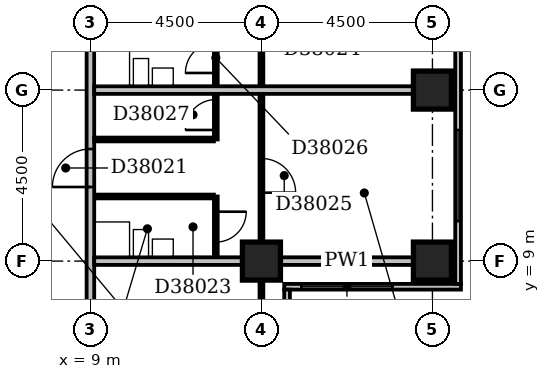
"""IFC4 building model, lengths in metres.
Left out: names, types, materials, properties, quantities, classifications, styles, units other than length and angle.
Written with IfcOpenShell. Run it as: python <this file> out.ifc"""

import sys

from ifc_helpers import new_model, si_unit, direction, frame, frame_2d, origin, origin_2d, place, context, subcontext, project, spatial, rectangle, extrude, element, fill, save


model = new_model("IFC4")
c1 = context("Model", 3, precision=1e-05, world=origin(), true_north=direction((0.0, 1.0)))
c2 = subcontext(c1, "Body", "Model", "MODEL_VIEW")
j1 = project(units=[si_unit("LENGTHUNIT", "METRE"), si_unit("PLANEANGLEUNIT", "RADIAN")], contexts=[c1])
p1 = place(None, origin())
s1 = spatial("IfcSite", under=j1, at=p1, CompositionType="ELEMENT")
p2 = place(p1, origin())
s2 = spatial("IfcBuilding", under=s1, at=p2, CompositionType="ELEMENT")
p3 = place(p2, frame((0.0, 0.0, 152.0)))
s3 = spatial("IfcBuildingStorey", under=s2, at=p3, CompositionType="ELEMENT", Elevation=152.0)
for number, where, z_axis, x_axis in (
    (1, (13.5, 9.0, -0.3), (0.0, 0.0, 1.0), (1.0, 0.0, 0.0)),
    (2, (18.0, 9.0, -0.3), (0.0, 0.0, 1.0), (1.0, 0.0, 0.0)),
    (3, (18.0, 13.5, -0.3), (0.0, 0.0, 1.0), (1.0, 0.0, 0.0)),
):
    element("IfcColumn", number, at=place(p3, frame(where, z_axis=z_axis, x_axis=x_axis)), inside=s3, PredefinedType="COLUMN", context=c2, shape_type="SweptSolid", body=[
        extrude(rectangle(XDim=1.0, YDim=1.0, at=origin_2d()), origin(), (0.0, 0.0, 1.0), 3.6),
    ])
p4 = place(p3, frame((14.175, 3.9, 0.0), z_axis=(0.0, 0.0, 1.0), x_axis=(0.0, 1.0, 0.0)))
e4 = element("IfcWall", 4, at=p4, inside=s3, PredefinedType="STANDARD", context=c2, shape_type="SweptSolid", body=[
    extrude(rectangle(XDim=4.35, YDim=0.15, at=frame_2d((2.175, 0.0))), origin(), (0.0, 0.0, 1.0), 2.7),
])
p5 = place(p4, frame((1.65, 0.0, 0.6)))
e5 = element("IfcOpeningElement", 5, at=p5, cuts=e4, PredefinedType="OPENING", context=c2, shape_type="SweptSolid", body=[
    extrude(rectangle(XDim=2.4, YDim=1.8, at=frame_2d((1.2, 0.9))), frame((0.0, 0.087, 0.0), z_axis=(0.0, -1.0, 0.0), x_axis=(1.0, 0.0, 0.0)), (0.0, 0.0, 1.0), 0.174),
])
p6 = place(p3, frame((14.1, 8.325, 0.0), z_axis=(0.0, 0.0, 1.0), x_axis=(1.0, 0.0, 0.0)))
e6 = element("IfcWall", 6, at=p6, inside=s3, PredefinedType="STANDARD", context=c2, shape_type="SweptSolid", body=[
    extrude(rectangle(XDim=4.65, YDim=0.15, at=frame_2d((2.325, 0.0))), origin(), (0.0, 0.0, 1.0), 2.7),
])
p7 = place(p6, frame((0.45, 0.0, 0.6)))
e7 = element("IfcOpeningElement", 7, at=p7, cuts=e6, PredefinedType="OPENING", context=c2, shape_type="SweptSolid", body=[
    extrude(rectangle(XDim=2.4, YDim=1.8, at=frame_2d((1.2, 0.9))), frame((0.0, 0.087, 0.0), z_axis=(0.0, -1.0, 0.0), x_axis=(1.0, 0.0, 0.0)), (0.0, 0.0, 1.0), 0.174),
])
p8 = place(p3, frame((18.675, 8.4, 0.0), z_axis=(0.0, 0.0, 1.0), x_axis=(0.0, 1.0, 0.0)))
e8 = element("IfcWall", 8, at=p8, inside=s3, PredefinedType="STANDARD", context=c2, shape_type="SweptSolid", body=[
    extrude(rectangle(XDim=8.85, YDim=0.15, at=frame_2d((4.425, 0.0))), origin(), (0.0, 0.0, 1.0), 2.7),
])
p9 = place(p8, frame((1.65, 0.0, 0.6)))
e9 = element("IfcOpeningElement", 9, at=p9, cuts=e8, PredefinedType="OPENING", context=c2, shape_type="SweptSolid", body=[
    extrude(rectangle(XDim=2.4, YDim=1.8, at=frame_2d((1.2, 0.9))), frame((0.0, 0.087, 0.0), z_axis=(0.0, -1.0, 0.0), x_axis=(1.0, 0.0, 0.0)), (0.0, 0.0, 1.0), 0.174),
])
p10 = place(p8, frame((6.15, 0.0, 0.6)))
e10 = element("IfcOpeningElement", 10, at=p10, cuts=e8, PredefinedType="OPENING", context=c2, shape_type="SweptSolid", body=[
    extrude(rectangle(XDim=2.4, YDim=1.8, at=frame_2d((1.2, 0.9))), frame((0.0, 0.087, 0.0), z_axis=(0.0, -1.0, 0.0), x_axis=(1.0, 0.0, 0.0)), (0.0, 0.0, 1.0), 0.174),
])
p11 = place(p3, frame((9.0, 5.0, 0.0), z_axis=(0.0, 0.0, 1.0), x_axis=(0.0, 1.0, 0.0)))
e11 = element("IfcWall", 11, at=p11, inside=s3, PredefinedType="PARTITIONING", context=c2, shape_type="SweptSolid", body=[
    extrude(rectangle(XDim=27.75, YDim=0.2, at=frame_2d((13.875, 0.0))), origin(), (0.0, 0.0, 1.0), 3.3),
])
p12 = place(p11, frame((22.8, 0.0, 0.0)))
e12 = element("IfcOpeningElement", 12, at=p12, cuts=e11, PredefinedType="OPENING", context=c2, shape_type="SweptSolid", body=[
    extrude(rectangle(XDim=1.0, YDim=2.1, at=frame_2d((0.5, 1.05))), frame((0.0, 0.112, 0.0), z_axis=(0.0, -1.0, 0.0), x_axis=(1.0, 0.0, 0.0)), (0.0, 0.0, 1.0), 0.224),
])
p13 = place(p11, frame((14.95, 0.0, 0.0)))
e13 = element("IfcOpeningElement", 13, at=p13, cuts=e11, PredefinedType="OPENING", context=c2, shape_type="SweptSolid", body=[
    extrude(rectangle(XDim=1.0, YDim=2.1, at=frame_2d((0.5, 1.05))), frame((0.0, 0.112, 0.0), z_axis=(0.0, -1.0, 0.0), x_axis=(1.0, 0.0, 0.0)), (0.0, 0.0, 1.0), 0.224),
])
p14 = place(p11, frame((10.45, 0.0, 0.0)))
e14 = element("IfcOpeningElement", 14, at=p14, cuts=e11, PredefinedType="OPENING", context=c2, shape_type="SweptSolid", body=[
    extrude(rectangle(XDim=1.0, YDim=2.1, at=frame_2d((0.5, 1.05))), frame((0.0, 0.112, 0.0), z_axis=(0.0, -1.0, 0.0), x_axis=(1.0, 0.0, 0.0)), (0.0, 0.0, 1.0), 0.224),
])
p15 = place(p11, frame((5.95, 0.0, 0.0)))
e15 = element("IfcOpeningElement", 15, at=p15, cuts=e11, PredefinedType="OPENING", context=c2, shape_type="SweptSolid", body=[
    extrude(rectangle(XDim=1.0, YDim=2.1, at=frame_2d((0.5, 1.05))), frame((0.0, 0.112, 0.0), z_axis=(0.0, -1.0, 0.0), x_axis=(1.0, 0.0, 0.0)), (0.0, 0.0, 1.0), 0.224),
])
p16 = place(p11, frame((1.5, 0.0, 0.0)))
e16 = element("IfcOpeningElement", 16, at=p16, cuts=e11, PredefinedType="OPENING", context=c2, shape_type="SweptSolid", body=[
    extrude(rectangle(XDim=0.9, YDim=2.1, at=frame_2d((0.45, 1.05))), frame((0.0, 0.112, 0.0), z_axis=(0.0, -1.0, 0.0), x_axis=(1.0, 0.0, 0.0)), (0.0, 0.0, 1.0), 0.224),
])
p17 = place(p3, frame((13.5, 5.0, 0.0), z_axis=(0.0, 0.0, 1.0), x_axis=(0.0, 1.0, 0.0)))
e17 = element("IfcWall", 17, at=p17, inside=s3, PredefinedType="PARTITIONING", context=c2, shape_type="SweptSolid", body=[
    extrude(rectangle(XDim=3.5, YDim=0.1, at=frame_2d((1.75, 0.0))), origin(), (0.0, 0.0, 1.0), 2.7),
])
p18 = place(p3, frame((9.1, 9.0, 0.0), z_axis=(0.0, 0.0, 1.0), x_axis=(1.0, 0.0, 0.0)))
e18 = element("IfcWall", 18, at=p18, inside=s3, PredefinedType="PARTITIONING", context=c2, shape_type="SweptSolid", body=[
    extrude(rectangle(XDim=3.9, YDim=0.2, at=frame_2d((1.95, 0.0))), origin(), (0.0, 0.0, 1.0), 3.3),
])
p19 = place(p3, frame((14.0, 9.0, 0.0), z_axis=(0.0, 0.0, 1.0), x_axis=(1.0, 0.0, 0.0)))
e19 = element("IfcWall", 19, at=p19, inside=s3, PredefinedType="PARTITIONING", context=c2, shape_type="SweptSolid", body=[
    extrude(rectangle(XDim=3.5, YDim=0.2, at=frame_2d((1.75, 0.0))), origin(), (0.0, 0.0, 1.0), 2.7),
])
p20 = place(p3, frame((12.3, 9.1, 0.0), z_axis=(0.0, 0.0, 1.0), x_axis=(0.0, 1.0, 0.0)))
e20 = element("IfcWall", 20, at=p20, inside=s3, PredefinedType="PARTITIONING", context=c2, shape_type="SweptSolid", body=[
    extrude(rectangle(XDim=1.6, YDim=0.1, at=frame_2d((0.8, 0.0))), origin(), (0.0, 0.0, 1.0), 3.3),
])
p21 = place(p20, frame((0.4, 0.0, 0.0)))
e21 = element("IfcOpeningElement", 21, at=p21, cuts=e20, PredefinedType="OPENING", context=c2, shape_type="SweptSolid", body=[
    extrude(rectangle(XDim=0.8, YDim=2.1, at=frame_2d((0.4, 1.05))), frame((0.0, 0.062, 0.0), z_axis=(0.0, -1.0, 0.0), x_axis=(1.0, 0.0, 0.0)), (0.0, 0.0, 1.0), 0.124),
])
p22 = place(p3, frame((13.5, 9.5, 0.0), z_axis=(0.0, 0.0, 1.0), x_axis=(0.0, 1.0, 0.0)))
e22 = element("IfcWall", 22, at=p22, inside=s3, PredefinedType="PARTITIONING", context=c2, shape_type="SweptSolid", body=[
    extrude(rectangle(XDim=8.4, YDim=0.1, at=frame_2d((4.2, 0.0))), origin(), (0.0, 0.0, 1.0), 3.3),
])
p23 = place(p22, frame((5.8, 0.0, 0.0)))
e23 = element("IfcOpeningElement", 23, at=p23, cuts=e22, PredefinedType="OPENING", context=c2, shape_type="SweptSolid", body=[
    extrude(rectangle(XDim=0.9, YDim=2.1, at=frame_2d((0.45, 1.05))), frame((0.0, 0.062, 0.0), z_axis=(0.0, -1.0, 0.0), x_axis=(1.0, 0.0, 0.0)), (0.0, 0.0, 1.0), 0.124),
])
p24 = place(p22, frame((1.3, 0.0, 0.0)))
e24 = element("IfcOpeningElement", 24, at=p24, cuts=e22, PredefinedType="OPENING", context=c2, shape_type="SweptSolid", body=[
    extrude(rectangle(XDim=0.9, YDim=2.1, at=frame_2d((0.45, 1.05))), frame((0.0, 0.062, 0.0), z_axis=(0.0, -1.0, 0.0), x_axis=(1.0, 0.0, 0.0)), (0.0, 0.0, 1.0), 0.124),
])
p25 = place(p3, frame((9.1, 10.7, 0.0), z_axis=(0.0, 0.0, 1.0), x_axis=(1.0, 0.0, 0.0)))
e25 = element("IfcWall", 25, at=p25, inside=s3, PredefinedType="PLUMBINGWALL", context=c2, shape_type="SweptSolid", body=[
    extrude(rectangle(XDim=3.15, YDim=0.1, at=frame_2d((1.575, 0.0))), origin(), (0.0, 0.0, 1.0), 3.3),
])
p26 = place(p3, frame((9.1, 12.2, 0.0), z_axis=(0.0, 0.0, 1.0), x_axis=(1.0, 0.0, 0.0)))
e26 = element("IfcWall", 26, at=p26, inside=s3, PredefinedType="PARTITIONING", context=c2, shape_type="SweptSolid", body=[
    extrude(rectangle(XDim=3.15, YDim=0.1, at=frame_2d((1.575, 0.0))), origin(), (0.0, 0.0, 1.0), 3.3),
])
p27 = place(p3, frame((12.3, 12.2, 0.0), z_axis=(0.0, 0.0, 1.0), x_axis=(0.0, 1.0, 0.0)))
e27 = element("IfcWall", 27, at=p27, inside=s3, PredefinedType="PARTITIONING", context=c2, shape_type="SweptSolid", body=[
    extrude(rectangle(XDim=3.0, YDim=0.1, at=frame_2d((1.5, 0.0))), origin(), (0.0, 0.0, 1.0), 3.3),
])
p28 = place(p27, frame((1.75, 0.0, 0.0)))
e28 = element("IfcOpeningElement", 28, at=p28, cuts=e27, PredefinedType="OPENING", context=c2, shape_type="SweptSolid", body=[
    extrude(rectangle(XDim=0.8, YDim=2.1, at=frame_2d((0.4, 1.05))), frame((0.0, 0.062, 0.0), z_axis=(0.0, -1.0, 0.0), x_axis=(1.0, 0.0, 0.0)), (0.0, 0.0, 1.0), 0.124),
])
p29 = place(p27, frame((0.25, 0.0, 0.0)))
e29 = element("IfcOpeningElement", 29, at=p29, cuts=e27, PredefinedType="OPENING", context=c2, shape_type="SweptSolid", body=[
    extrude(rectangle(XDim=0.8, YDim=2.1, at=frame_2d((0.4, 1.05))), frame((0.0, 0.062, 0.0), z_axis=(0.0, -1.0, 0.0), x_axis=(1.0, 0.0, 0.0)), (0.0, 0.0, 1.0), 0.124),
])
p30 = place(p3, frame((9.1, 13.5, 0.0), z_axis=(0.0, 0.0, 1.0), x_axis=(1.0, 0.0, 0.0)))
e30 = element("IfcWall", 30, at=p30, inside=s3, PredefinedType="PARTITIONING", context=c2, shape_type="SweptSolid", body=[
    extrude(rectangle(XDim=8.4, YDim=0.2, at=frame_2d((4.2, 0.0))), origin(), (0.0, 0.0, 1.0), 3.3),
])
p31 = place(p7, origin())
e31 = element("IfcWindow", 31, at=p31, inside=s3, PartitioningType="SINGLE_PANEL", PredefinedType="WINDOW", context=c2, shape_type="SweptSolid", body=[
    extrude(rectangle(XDim=2.4, YDim=1.8, at=frame_2d((1.2, 0.9))), frame((0.0, 0.03, 0.0), z_axis=(0.0, -1.0, 0.0), x_axis=(1.0, 0.0, 0.0)), (0.0, 0.0, 1.0), 0.06),
])
fill(e7, e31)
p32 = place(p9, origin())
e32 = element("IfcWindow", 32, at=p32, inside=s3, PartitioningType="SINGLE_PANEL", PredefinedType="WINDOW", context=c2, shape_type="SweptSolid", body=[
    extrude(rectangle(XDim=2.4, YDim=1.8, at=frame_2d((1.2, 0.9))), frame((0.0, 0.03, 0.0), z_axis=(0.0, -1.0, 0.0), x_axis=(1.0, 0.0, 0.0)), (0.0, 0.0, 1.0), 0.06),
])
fill(e9, e32)
p33 = place(p15, origin())
e33 = element("IfcDoor", 33, at=p33, inside=s3, OperationType="SINGLE_SWING_LEFT", PredefinedType="DOOR", context=c2, shape_type="SweptSolid", body=[
    extrude(rectangle(XDim=1.0, YDim=2.1, at=frame_2d((0.5, 1.05))), frame((0.0, 0.025, 0.0), z_axis=(0.0, -1.0, 0.0), x_axis=(1.0, 0.0, 0.0)), (0.0, 0.0, 1.0), 0.05),
])
fill(e15, e33)
p34 = place(p21, origin())
e34 = element("IfcDoor", 34, at=p34, inside=s3, OperationType="SINGLE_SWING_RIGHT", PredefinedType="DOOR", context=c2, shape_type="SweptSolid", body=[
    extrude(rectangle(XDim=0.8, YDim=2.1, at=frame_2d((0.4, 1.05))), frame((0.0, 0.025, 0.0), z_axis=(0.0, -1.0, 0.0), x_axis=(1.0, 0.0, 0.0)), (0.0, 0.0, 1.0), 0.05),
])
fill(e21, e34)
p35 = place(p24, frame((0.9, 0.0, 0.0), z_axis=(0.0, 0.0, 1.0), x_axis=(-1.0, 0.0, 0.0)))
e35 = element("IfcDoor", 35, at=p35, inside=s3, OperationType="SINGLE_SWING_RIGHT", PredefinedType="DOOR", context=c2, shape_type="SweptSolid", body=[
    extrude(rectangle(XDim=0.9, YDim=2.1, at=frame_2d((0.45, 1.05))), frame((0.0, 0.025, 0.0), z_axis=(0.0, -1.0, 0.0), x_axis=(1.0, 0.0, 0.0)), (0.0, 0.0, 1.0), 0.05),
])
fill(e24, e35)
p36 = place(p28, origin())
e36 = element("IfcDoor", 36, at=p36, inside=s3, OperationType="SINGLE_SWING_LEFT", PredefinedType="DOOR", context=c2, shape_type="SweptSolid", body=[
    extrude(rectangle(XDim=0.8, YDim=2.1, at=frame_2d((0.4, 1.05))), frame((0.0, 0.025, 0.0), z_axis=(0.0, -1.0, 0.0), x_axis=(1.0, 0.0, 0.0)), (0.0, 0.0, 1.0), 0.05),
])
fill(e28, e36)
p37 = place(p29, origin())
e37 = element("IfcDoor", 37, at=p37, inside=s3, OperationType="SINGLE_SWING_LEFT", PredefinedType="DOOR", context=c2, shape_type="SweptSolid", body=[
    extrude(rectangle(XDim=0.8, YDim=2.1, at=frame_2d((0.4, 1.05))), frame((0.0, 0.025, 0.0), z_axis=(0.0, -1.0, 0.0), x_axis=(1.0, 0.0, 0.0)), (0.0, 0.0, 1.0), 0.05),
])
fill(e29, e37)
save(model, sys.argv[1])
